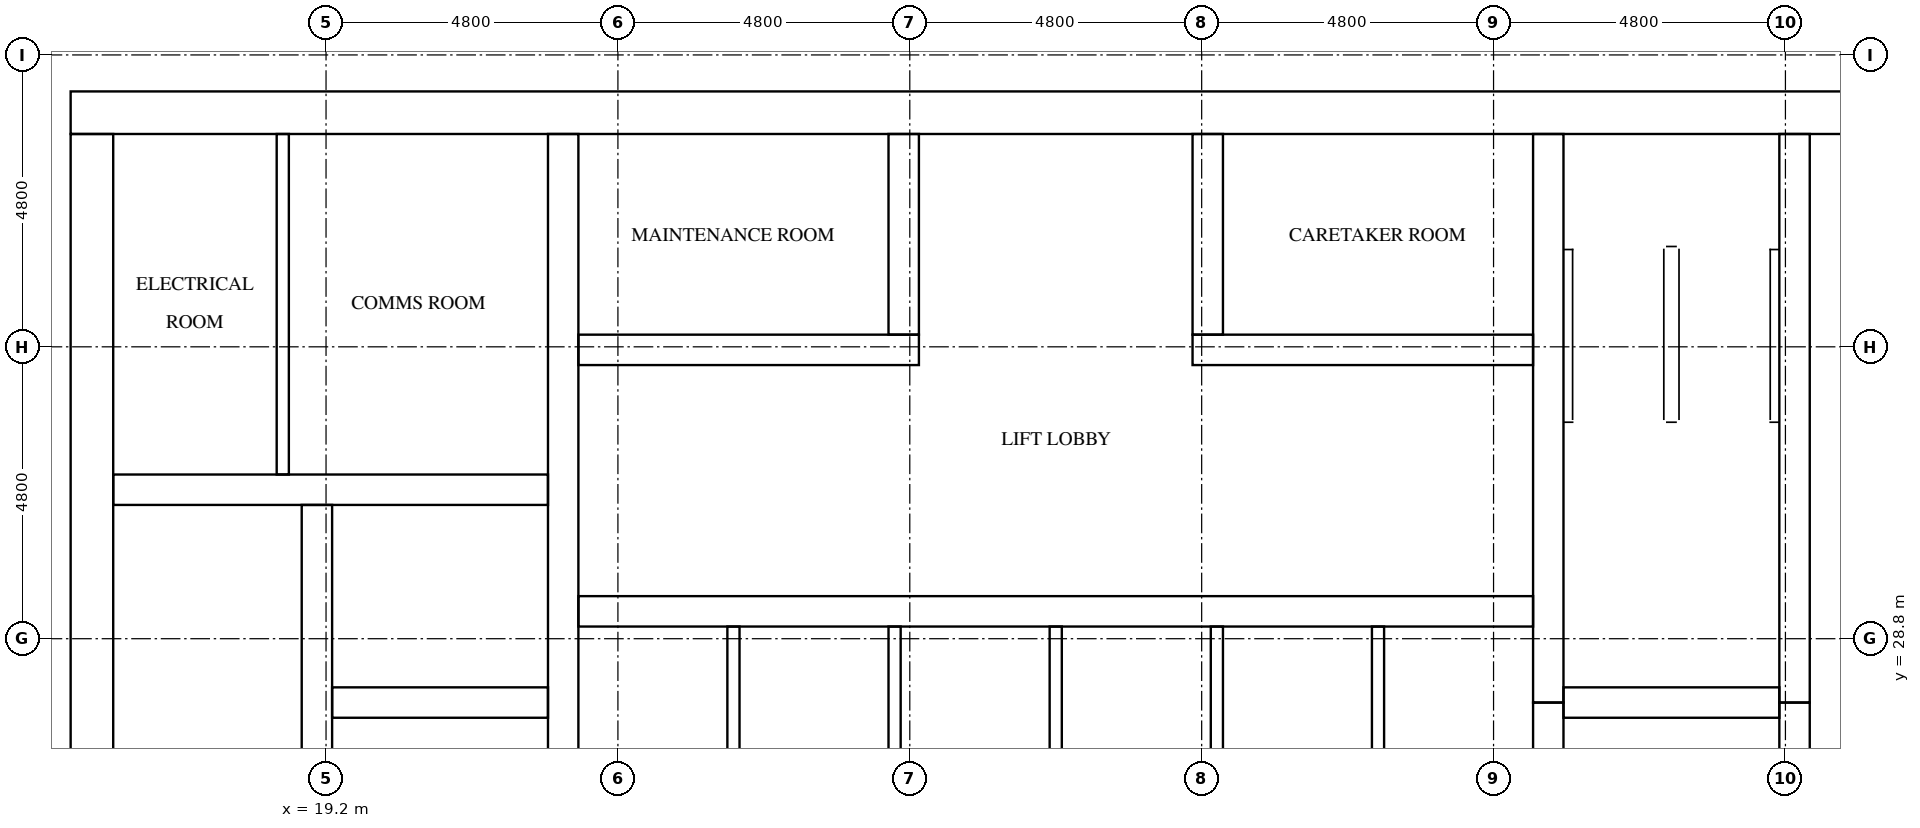
"""IFC4 building model, lengths in metres.
Left out: names, types, materials, properties, quantities, classifications, styles, units other than length and angle.
Written with IfcOpenShell. Run it as: python <this file> out.ifc"""

import sys

from ifc_helpers import new_model, si_unit, direction, frame, frame_2d, origin, place, context, subcontext, project, spatial, rectangle, extrude, element, fill, save


model = new_model("IFC4")
c1 = context("Model", 3, precision=1e-05, world=origin(), true_north=direction((0.0, 1.0)))
c2 = subcontext(c1, "Body", "Model", "MODEL_VIEW")
j1 = project(units=[si_unit("LENGTHUNIT", "METRE"), si_unit("PLANEANGLEUNIT", "RADIAN")], contexts=[c1])
p1 = place(None, origin())
s1 = spatial("IfcSite", under=j1, at=p1, CompositionType="ELEMENT")
p2 = place(p1, origin())
s2 = spatial("IfcBuilding", under=s1, at=p2, CompositionType="ELEMENT")
p3 = place(p2, frame((0.0, 0.0, 185.9)))
s3 = spatial("IfcBuildingStorey", under=s2, at=p3, CompositionType="ELEMENT", Elevation=185.9)
p4 = place(p3, frame((15.0, 37.45, 0.0), z_axis=(0.0, 0.0, 1.0), x_axis=(1.0, 0.0, 0.0)))
e1 = element("IfcWall", 1, at=p4, inside=s3, PredefinedType="SHEAR", context=c2, shape_type="SweptSolid", body=[
    extrude(rectangle(XDim=32.4, YDim=0.7, at=frame_2d((16.2, 0.0))), origin(), (0.0, 0.0, 1.0), 3.2),
])
p5 = place(p4, frame((15.3, 0.0, 0.0)))
e2 = element("IfcOpeningElement", 2, at=p5, cuts=e1, PredefinedType="OPENING", context=c2, shape_type="SweptSolid", body=[
    extrude(rectangle(XDim=1.8, YDim=2.1, at=frame_2d((0.9, 1.05))), frame((0.0, 0.36, 0.0), z_axis=(0.0, -1.0, 0.0), x_axis=(1.0, 0.0, 0.0)), (0.0, 0.0, 1.0), 0.72),
])
p6 = place(p4, frame((1.544, 0.0, 0.0)))
e3 = element("IfcOpeningElement", 3, at=p6, cuts=e1, PredefinedType="OPENING", context=c2, shape_type="SweptSolid", body=[
    extrude(rectangle(XDim=1.0, YDim=2.1, at=frame_2d((0.5, 1.05))), frame((0.0, 0.36, 0.0), z_axis=(0.0, -1.0, 0.0), x_axis=(1.0, 0.0, 0.0)), (0.0, 0.0, 1.0), 0.72),
])
p7 = place(p4, frame((5.219, 0.0, 0.0)))
e4 = element("IfcOpeningElement", 4, at=p7, cuts=e1, PredefinedType="OPENING", context=c2, shape_type="SweptSolid", body=[
    extrude(rectangle(XDim=1.0, YDim=2.1, at=frame_2d((0.5, 1.05))), frame((0.0, 0.36, 0.0), z_axis=(0.0, -1.0, 0.0), x_axis=(1.0, 0.0, 0.0)), (0.0, 0.0, 1.0), 0.72),
])
p8 = place(p3, frame((15.35, 15.7, 0.0), z_axis=(0.0, 0.0, 1.0), x_axis=(0.0, 1.0, 0.0)))
e5 = element("IfcWall", 5, at=p8, inside=s3, PredefinedType="SHEAR", context=c2, shape_type="SweptSolid", body=[
    extrude(rectangle(XDim=21.4, YDim=0.7, at=frame_2d((10.7, 0.0))), origin(), (0.0, 0.0, 1.0), 3.2),
])
p9 = place(p8, frame((5.06, 0.0, 0.0)))
e6 = element("IfcOpeningElement", 6, at=p9, cuts=e5, PredefinedType="OPENING", context=c2, shape_type="SweptSolid", body=[
    extrude(rectangle(XDim=1.2, YDim=2.1, at=frame_2d((0.6, 1.05))), frame((0.0, 0.36, 0.0), z_axis=(0.0, -1.0, 0.0), x_axis=(1.0, 0.0, 0.0)), (0.0, 0.0, 1.0), 0.72),
])
p10 = place(p3, frame((19.05, 15.7, 0.0), z_axis=(0.0, 0.0, 1.0), x_axis=(0.0, 1.0, 0.0)))
e7 = element("IfcWall", 7, at=p10, inside=s3, PredefinedType="SHEAR", context=c2, shape_type="SweptSolid", body=[
    extrude(rectangle(XDim=15.3, YDim=0.5, at=frame_2d((7.65, 0.0))), origin(), (0.0, 0.0, 1.0), 3.2),
])
p11 = place(p10, frame((9.75, 0.0, 0.0)))
e8 = element("IfcOpeningElement", 8, at=p11, cuts=e7, PredefinedType="OPENING", context=c2, shape_type="SweptSolid", body=[
    extrude(rectangle(XDim=1.1, YDim=2.1, at=frame_2d((0.55, 1.05))), frame((0.0, 0.26, 0.0), z_axis=(0.0, -1.0, 0.0), x_axis=(1.0, 0.0, 0.0)), (0.0, 0.0, 1.0), 0.52),
])
p12 = place(p10, frame((13.25, 0.0, 0.0)))
e9 = element("IfcOpeningElement", 9, at=p12, cuts=e7, PredefinedType="OPENING", context=c2, shape_type="SweptSolid", body=[
    extrude(rectangle(XDim=1.1, YDim=2.1, at=frame_2d((0.55, 1.05))), frame((0.0, 0.26, 0.0), z_axis=(0.0, -1.0, 0.0), x_axis=(1.0, 0.0, 0.0)), (0.0, 0.0, 1.0), 0.52),
])
p13 = place(p10, frame((0.5, 0.0, 0.0)))
e10 = element("IfcOpeningElement", 10, at=p13, cuts=e7, PredefinedType="OPENING", context=c2, shape_type="SweptSolid", body=[
    extrude(rectangle(XDim=1.2, YDim=2.1, at=frame_2d((0.6, 1.05))), frame((0.0, 0.26, 0.0), z_axis=(0.0, -1.0, 0.0), x_axis=(1.0, 0.0, 0.0)), (0.0, 0.0, 1.0), 0.52),
])
p14 = place(p3, frame((23.1, 15.7, 0.0), z_axis=(0.0, 0.0, 1.0), x_axis=(0.0, 1.0, 0.0)))
e11 = element("IfcWall", 11, at=p14, inside=s3, PredefinedType="SHEAR", context=c2, shape_type="SweptSolid", body=[
    extrude(rectangle(XDim=21.4, YDim=0.5, at=frame_2d((10.7, 0.0))), origin(), (0.0, 0.0, 1.0), 3.2),
])
p15 = place(p3, frame((39.3, 24.25, 0.0), z_axis=(0.0, 0.0, 1.0), x_axis=(0.0, 1.0, 0.0)))
e12 = element("IfcWall", 12, at=p15, inside=s3, PredefinedType="SHEAR", context=c2, shape_type="SweptSolid", body=[
    extrude(rectangle(XDim=3.5, YDim=0.5, at=frame_2d((1.75, 0.0))), origin(), (0.0, 0.0, 1.0), 3.2),
])
p16 = place(p3, frame((39.3, 27.75, 0.0), z_axis=(0.0, 0.0, 1.0), x_axis=(0.0, 1.0, 0.0)))
e13 = element("IfcWall", 13, at=p16, inside=s3, PredefinedType="SHEAR", context=c2, shape_type="SweptSolid", body=[
    extrude(rectangle(XDim=9.35, YDim=0.5, at=frame_2d((4.675, 0.0))), origin(), (0.0, 0.0, 1.0), 3.2),
])
p17 = place(p3, frame((43.35, 24.25, 0.0), z_axis=(0.0, 0.0, 1.0), x_axis=(0.0, 1.0, 0.0)))
e14 = element("IfcWall", 14, at=p17, inside=s3, PredefinedType="SHEAR", context=c2, shape_type="SweptSolid", body=[
    extrude(rectangle(XDim=3.5, YDim=0.5, at=frame_2d((1.75, 0.0))), origin(), (0.0, 0.0, 1.0), 3.2),
])
p18 = place(p17, frame((1.2, 0.0, 0.0)))
e15 = element("IfcOpeningElement", 15, at=p18, cuts=e14, PredefinedType="OPENING", context=c2, shape_type="SweptSolid", body=[
    extrude(rectangle(XDim=1.1, YDim=2.1, at=frame_2d((0.55, 1.05))), frame((0.0, 0.26, 0.0), z_axis=(0.0, -1.0, 0.0), x_axis=(1.0, 0.0, 0.0)), (0.0, 0.0, 1.0), 0.52),
])
p19 = place(p3, frame((43.35, 27.75, 0.0), z_axis=(0.0, 0.0, 1.0), x_axis=(0.0, 1.0, 0.0)))
e16 = element("IfcWall", 16, at=p19, inside=s3, PredefinedType="SHEAR", context=c2, shape_type="SweptSolid", body=[
    extrude(rectangle(XDim=9.35, YDim=0.5, at=frame_2d((4.675, 0.0))), origin(), (0.0, 0.0, 1.0), 3.2),
])
p20 = place(p19, frame((7.65, 0.0, 0.0)))
e17 = element("IfcOpeningElement", 17, at=p20, cuts=e16, PredefinedType="OPENING", context=c2, shape_type="SweptSolid", body=[
    extrude(rectangle(XDim=1.2, YDim=2.1, at=frame_2d((0.6, 1.05))), frame((0.0, 0.26, 0.0), z_axis=(0.0, -1.0, 0.0), x_axis=(1.0, 0.0, 0.0)), (0.0, 0.0, 1.0), 0.52),
])
p21 = place(p3, frame((19.3, 27.75, 0.0), z_axis=(0.0, 0.0, 1.0), x_axis=(1.0, 0.0, 0.0)))
e18 = element("IfcWall", 18, at=p21, inside=s3, PredefinedType="SHEAR", context=c2, shape_type="SweptSolid", body=[
    extrude(rectangle(XDim=3.55, YDim=0.5, at=frame_2d((1.775, 0.0))), origin(), (0.0, 0.0, 1.0), 3.2),
])
p22 = place(p3, frame((15.7, 31.25, 0.0), z_axis=(0.0, 0.0, 1.0), x_axis=(1.0, 0.0, 0.0)))
e19 = element("IfcWall", 19, at=p22, inside=s3, PredefinedType="SHEAR", context=c2, shape_type="SweptSolid", body=[
    extrude(rectangle(XDim=7.15, YDim=0.5, at=frame_2d((3.575, 0.0))), origin(), (0.0, 0.0, 1.0), 3.2),
])
p23 = place(p3, frame((39.55, 27.75, 0.0), z_axis=(0.0, 0.0, 1.0), x_axis=(1.0, 0.0, 0.0)))
e20 = element("IfcWall", 20, at=p23, inside=s3, PredefinedType="SHEAR", context=c2, shape_type="SweptSolid", body=[
    extrude(rectangle(XDim=3.55, YDim=0.5, at=frame_2d((1.775, 0.0))), origin(), (0.0, 0.0, 1.0), 3.2),
])
p24 = place(p3, frame((23.35, 29.25, 0.0), z_axis=(0.0, 0.0, 1.0), x_axis=(1.0, 0.0, 0.0)))
e21 = element("IfcWall", 21, at=p24, inside=s3, PredefinedType="SHEAR", context=c2, shape_type="SweptSolid", body=[
    extrude(rectangle(XDim=15.7, YDim=0.5, at=frame_2d((7.85, 0.0))), origin(), (0.0, 0.0, 1.0), 3.2),
])
p25 = place(p24, frame((0.675, 0.0, 0.0)))
e22 = element("IfcOpeningElement", 22, at=p25, cuts=e21, PredefinedType="OPENING", context=c2, shape_type="SweptSolid", body=[
    extrude(rectangle(XDim=1.1, YDim=2.1, at=frame_2d((0.55, 1.05))), frame((0.0, 0.26, 0.0), z_axis=(0.0, -1.0, 0.0), x_axis=(1.0, 0.0, 0.0)), (0.0, 0.0, 1.0), 0.52),
])
p26 = place(p24, frame((3.325, 0.0, 0.0)))
e23 = element("IfcOpeningElement", 23, at=p26, cuts=e21, PredefinedType="OPENING", context=c2, shape_type="SweptSolid", body=[
    extrude(rectangle(XDim=1.1, YDim=2.1, at=frame_2d((0.55, 1.05))), frame((0.0, 0.26, 0.0), z_axis=(0.0, -1.0, 0.0), x_axis=(1.0, 0.0, 0.0)), (0.0, 0.0, 1.0), 0.52),
])
p27 = place(p24, frame((5.975, 0.0, 0.0)))
e24 = element("IfcOpeningElement", 24, at=p27, cuts=e21, PredefinedType="OPENING", context=c2, shape_type="SweptSolid", body=[
    extrude(rectangle(XDim=1.1, YDim=2.1, at=frame_2d((0.55, 1.05))), frame((0.0, 0.26, 0.0), z_axis=(0.0, -1.0, 0.0), x_axis=(1.0, 0.0, 0.0)), (0.0, 0.0, 1.0), 0.52),
])
p28 = place(p24, frame((8.625, 0.0, 0.0)))
e25 = element("IfcOpeningElement", 25, at=p28, cuts=e21, PredefinedType="OPENING", context=c2, shape_type="SweptSolid", body=[
    extrude(rectangle(XDim=1.1, YDim=2.1, at=frame_2d((0.55, 1.05))), frame((0.0, 0.26, 0.0), z_axis=(0.0, -1.0, 0.0), x_axis=(1.0, 0.0, 0.0)), (0.0, 0.0, 1.0), 0.52),
])
p29 = place(p24, frame((11.275, 0.0, 0.0)))
e26 = element("IfcOpeningElement", 26, at=p29, cuts=e21, PredefinedType="OPENING", context=c2, shape_type="SweptSolid", body=[
    extrude(rectangle(XDim=1.1, YDim=2.1, at=frame_2d((0.55, 1.05))), frame((0.0, 0.26, 0.0), z_axis=(0.0, -1.0, 0.0), x_axis=(1.0, 0.0, 0.0)), (0.0, 0.0, 1.0), 0.52),
])
p30 = place(p24, frame((13.925, 0.0, 0.0)))
e27 = element("IfcOpeningElement", 27, at=p30, cuts=e21, PredefinedType="OPENING", context=c2, shape_type="SweptSolid", body=[
    extrude(rectangle(XDim=1.1, YDim=2.1, at=frame_2d((0.55, 1.05))), frame((0.0, 0.26, 0.0), z_axis=(0.0, -1.0, 0.0), x_axis=(1.0, 0.0, 0.0)), (0.0, 0.0, 1.0), 0.52),
])
p31 = place(p3, frame((23.35, 33.55, 0.0), z_axis=(0.0, 0.0, 1.0), x_axis=(1.0, 0.0, 0.0)))
e28 = element("IfcWall", 28, at=p31, inside=s3, PredefinedType="SHEAR", context=c2, shape_type="SweptSolid", body=[
    extrude(rectangle(XDim=5.6, YDim=0.5, at=frame_2d((2.8, 0.0))), origin(), (0.0, 0.0, 1.0), 3.2),
])
p32 = place(p31, frame((2.05, 0.0, 0.0)))
e29 = element("IfcOpeningElement", 29, at=p32, cuts=e28, PredefinedType="OPENING", context=c2, shape_type="SweptSolid", body=[
    extrude(rectangle(XDim=1.0, YDim=2.1, at=frame_2d((0.5, 1.05))), frame((0.0, 0.26, 0.0), z_axis=(0.0, -1.0, 0.0), x_axis=(1.0, 0.0, 0.0)), (0.0, 0.0, 1.0), 0.52),
])
p33 = place(p3, frame((33.45, 33.55, 0.0), z_axis=(0.0, 0.0, 1.0), x_axis=(1.0, 0.0, 0.0)))
e30 = element("IfcWall", 30, at=p33, inside=s3, PredefinedType="SHEAR", context=c2, shape_type="SweptSolid", body=[
    extrude(rectangle(XDim=5.6, YDim=0.5, at=frame_2d((2.8, 0.0))), origin(), (0.0, 0.0, 1.0), 3.2),
])
p34 = place(p33, frame((2.55, 0.0, 0.0)))
e31 = element("IfcOpeningElement", 31, at=p34, cuts=e30, PredefinedType="OPENING", context=c2, shape_type="SweptSolid", body=[
    extrude(rectangle(XDim=1.0, YDim=2.1, at=frame_2d((0.5, 1.05))), frame((0.0, 0.26, 0.0), z_axis=(0.0, -1.0, 0.0), x_axis=(1.0, 0.0, 0.0)), (0.0, 0.0, 1.0), 0.52),
])
for number, where, z_axis, x_axis in (
    (32, (28.7, 33.8, 0.0), (0.0, 0.0, 1.0), (0.0, 1.0, 0.0)),
    (33, (33.7, 33.8, 0.0), (0.0, 0.0, 1.0), (0.0, 1.0, 0.0)),
):
    element("IfcWall", number, at=place(p3, frame(where, z_axis=z_axis, x_axis=x_axis)), inside=s3, PredefinedType="SHEAR", context=c2, shape_type="SweptSolid", body=[
        extrude(rectangle(XDim=3.3, YDim=0.5, at=frame_2d((1.65, 0.0))), origin(), (0.0, 0.0, 1.0), 3.2),
    ])
for number, where, z_axis, x_axis in (
    (34, (25.9, 26.4, 0.0), (0.0, 0.0, 1.0), (0.0, 1.0, 0.0)),
    (35, (28.55, 26.4, 0.0), (0.0, 0.0, 1.0), (0.0, 1.0, 0.0)),
    (36, (31.2, 26.4, 0.0), (0.0, 0.0, 1.0), (0.0, 1.0, 0.0)),
    (37, (33.85, 26.4, 0.0), (0.0, 0.0, 1.0), (0.0, 1.0, 0.0)),
    (38, (36.5, 26.4, 0.0), (0.0, 0.0, 1.0), (0.0, 1.0, 0.0)),
):
    element("IfcWall", number, at=place(p3, frame(where, z_axis=z_axis, x_axis=x_axis)), inside=s3, PredefinedType="SOLIDWALL", context=c2, shape_type="SweptSolid", body=[
        extrude(rectangle(XDim=2.6, YDim=0.2, at=frame_2d((1.3, 0.0))), origin(), (0.0, 0.0, 1.0), 3.2),
    ])
p35 = place(p3, frame((18.489, 31.5, 0.0), z_axis=(0.0, 0.0, 1.0), x_axis=(0.0, 1.0, 0.0)))
e39 = element("IfcWall", 39, at=p35, inside=s3, PredefinedType="PARTITIONING", context=c2, shape_type="SweptSolid", body=[
    extrude(rectangle(XDim=5.6, YDim=0.2, at=frame_2d((2.8, 0.0))), origin(), (0.0, 0.0, 1.0), 3.2),
])
p36 = place(p25, origin())
e40 = element("IfcDoor", 40, at=p36, inside=s3, OperationType="DOUBLE_DOOR_SLIDING", PredefinedType="DOOR", context=c2, shape_type="SweptSolid", body=[
    extrude(rectangle(XDim=1.1, YDim=2.1, at=frame_2d((0.55, 1.05))), frame((0.0, 0.025, 0.0), z_axis=(0.0, -1.0, 0.0), x_axis=(1.0, 0.0, 0.0)), (0.0, 0.0, 1.0), 0.05),
])
fill(e22, e40)
p37 = place(p26, origin())
e41 = element("IfcDoor", 41, at=p37, inside=s3, OperationType="DOUBLE_DOOR_SLIDING", PredefinedType="DOOR", context=c2, shape_type="SweptSolid", body=[
    extrude(rectangle(XDim=1.1, YDim=2.1, at=frame_2d((0.55, 1.05))), frame((0.0, 0.025, 0.0), z_axis=(0.0, -1.0, 0.0), x_axis=(1.0, 0.0, 0.0)), (0.0, 0.0, 1.0), 0.05),
])
fill(e23, e41)
p38 = place(p27, origin())
e42 = element("IfcDoor", 42, at=p38, inside=s3, OperationType="DOUBLE_DOOR_SLIDING", PredefinedType="DOOR", context=c2, shape_type="SweptSolid", body=[
    extrude(rectangle(XDim=1.1, YDim=2.1, at=frame_2d((0.55, 1.05))), frame((0.0, 0.025, 0.0), z_axis=(0.0, -1.0, 0.0), x_axis=(1.0, 0.0, 0.0)), (0.0, 0.0, 1.0), 0.05),
])
fill(e24, e42)
p39 = place(p28, origin())
e43 = element("IfcDoor", 43, at=p39, inside=s3, OperationType="DOUBLE_DOOR_SLIDING", PredefinedType="DOOR", context=c2, shape_type="SweptSolid", body=[
    extrude(rectangle(XDim=1.1, YDim=2.1, at=frame_2d((0.55, 1.05))), frame((0.0, 0.025, 0.0), z_axis=(0.0, -1.0, 0.0), x_axis=(1.0, 0.0, 0.0)), (0.0, 0.0, 1.0), 0.05),
])
fill(e25, e43)
p40 = place(p29, origin())
e44 = element("IfcDoor", 44, at=p40, inside=s3, OperationType="DOUBLE_DOOR_SLIDING", PredefinedType="DOOR", context=c2, shape_type="SweptSolid", body=[
    extrude(rectangle(XDim=1.1, YDim=2.1, at=frame_2d((0.55, 1.05))), frame((0.0, 0.025, 0.0), z_axis=(0.0, -1.0, 0.0), x_axis=(1.0, 0.0, 0.0)), (0.0, 0.0, 1.0), 0.05),
])
fill(e26, e44)
p41 = place(p30, origin())
e45 = element("IfcDoor", 45, at=p41, inside=s3, OperationType="DOUBLE_DOOR_SLIDING", PredefinedType="DOOR", context=c2, shape_type="SweptSolid", body=[
    extrude(rectangle(XDim=1.1, YDim=2.1, at=frame_2d((0.55, 1.05))), frame((0.0, 0.025, 0.0), z_axis=(0.0, -1.0, 0.0), x_axis=(1.0, 0.0, 0.0)), (0.0, 0.0, 1.0), 0.05),
])
fill(e27, e45)
p42 = place(p12, origin())
e46 = element("IfcDoor", 46, at=p42, inside=s3, OperationType="DOUBLE_DOOR_SLIDING", PredefinedType="DOOR", context=c2, shape_type="SweptSolid", body=[
    extrude(rectangle(XDim=1.1, YDim=2.1, at=frame_2d((0.55, 1.05))), frame((0.0, 0.025, 0.0), z_axis=(0.0, -1.0, 0.0), x_axis=(1.0, 0.0, 0.0)), (0.0, 0.0, 1.0), 0.05),
])
fill(e9, e46)
p43 = place(p20, origin())
e47 = element("IfcDoor", 47, at=p43, inside=s3, OperationType="SINGLE_SWING_RIGHT", PredefinedType="DOOR", context=c2, shape_type="SweptSolid", body=[
    extrude(rectangle(XDim=1.2, YDim=2.1, at=frame_2d((0.6, 1.05))), frame((0.0, 0.025, 0.0), z_axis=(0.0, -1.0, 0.0), x_axis=(1.0, 0.0, 0.0)), (0.0, 0.0, 1.0), 0.05),
])
fill(e17, e47)
p44 = place(p5, origin())
e48 = element("IfcDoor", 48, at=p44, inside=s3, OperationType="DOUBLE_DOOR_SINGLE_SWING", PredefinedType="DOOR", context=c2, shape_type="SweptSolid", body=[
    extrude(rectangle(XDim=1.8, YDim=2.1, at=frame_2d((0.9, 1.05))), frame((0.0, 0.025, 0.0), z_axis=(0.0, -1.0, 0.0), x_axis=(1.0, 0.0, 0.0)), (0.0, 0.0, 1.0), 0.05),
])
fill(e2, e48)
p45 = place(p6, origin())
e49 = element("IfcDoor", 49, at=p45, inside=s3, OperationType="SINGLE_SWING_LEFT", PredefinedType="DOOR", context=c2, shape_type="SweptSolid", body=[
    extrude(rectangle(XDim=1.0, YDim=2.1, at=frame_2d((0.5, 1.05))), frame((0.0, 0.025, 0.0), z_axis=(0.0, -1.0, 0.0), x_axis=(1.0, 0.0, 0.0)), (0.0, 0.0, 1.0), 0.05),
])
fill(e3, e49)
p46 = place(p7, origin())
e50 = element("IfcDoor", 50, at=p46, inside=s3, OperationType="SINGLE_SWING_RIGHT", PredefinedType="DOOR", context=c2, shape_type="SweptSolid", body=[
    extrude(rectangle(XDim=1.0, YDim=2.1, at=frame_2d((0.5, 1.05))), frame((0.0, 0.025, 0.0), z_axis=(0.0, -1.0, 0.0), x_axis=(1.0, 0.0, 0.0)), (0.0, 0.0, 1.0), 0.05),
])
fill(e4, e50)
p47 = place(p32, frame((1.0, 0.0, 0.0), z_axis=(0.0, 0.0, 1.0), x_axis=(-1.0, 0.0, 0.0)))
e51 = element("IfcDoor", 51, at=p47, inside=s3, OperationType="SINGLE_SWING_LEFT", PredefinedType="DOOR", context=c2, shape_type="SweptSolid", body=[
    extrude(rectangle(XDim=1.0, YDim=2.1, at=frame_2d((0.5, 1.05))), frame((0.0, 0.025, 0.0), z_axis=(0.0, -1.0, 0.0), x_axis=(1.0, 0.0, 0.0)), (0.0, 0.0, 1.0), 0.05),
])
fill(e29, e51)
p48 = place(p34, frame((1.0, 0.0, 0.0), z_axis=(0.0, 0.0, 1.0), x_axis=(-1.0, 0.0, 0.0)))
e52 = element("IfcDoor", 52, at=p48, inside=s3, OperationType="SINGLE_SWING_RIGHT", PredefinedType="DOOR", context=c2, shape_type="SweptSolid", body=[
    extrude(rectangle(XDim=1.0, YDim=2.1, at=frame_2d((0.5, 1.05))), frame((0.0, 0.025, 0.0), z_axis=(0.0, -1.0, 0.0), x_axis=(1.0, 0.0, 0.0)), (0.0, 0.0, 1.0), 0.05),
])
fill(e31, e52)
save(model, sys.argv[1])
